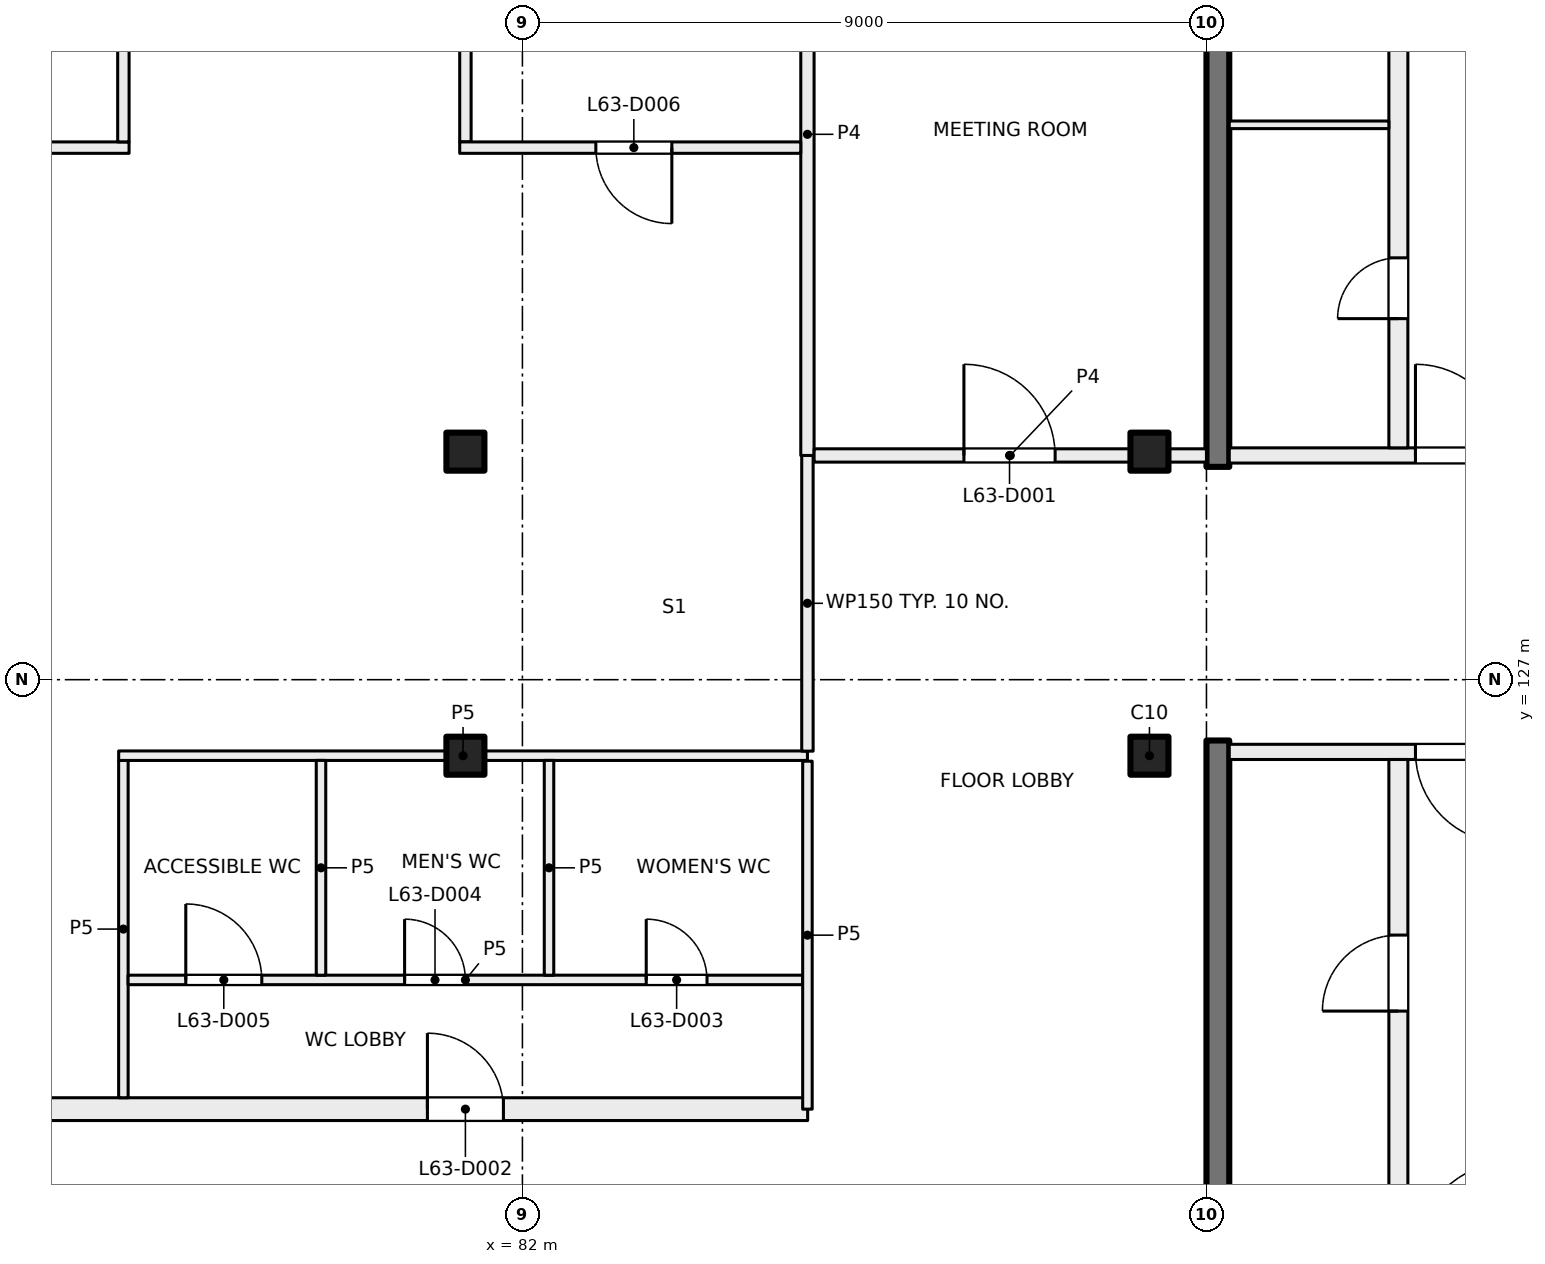
"""IFC4 building model, lengths in metres.
Left out: names, types, materials, properties, quantities, classifications, styles, units other than length and angle.
Written with IfcOpenShell. Run it as: python <this file> out.ifc"""

import sys

from ifc_helpers import new_model, si_unit, direction, frame, frame_2d, origin, origin_2d, place, context, subcontext, project, spatial, rectangle, extrude, element, fill, save


model = new_model("IFC4")
c1 = context("Model", 3, precision=1e-05, world=origin(), true_north=direction((0.0, 1.0)))
c2 = subcontext(c1, "Body", "Model", "MODEL_VIEW")
j1 = project(units=[si_unit("LENGTHUNIT", "METRE"), si_unit("PLANEANGLEUNIT", "RADIAN")], contexts=[c1])
p1 = place(None, origin())
s1 = spatial("IfcSite", under=j1, at=p1, CompositionType="ELEMENT")
p2 = place(p1, origin())
s2 = spatial("IfcBuilding", under=s1, at=p2, CompositionType="ELEMENT")
p3 = place(p2, frame((0.0, 0.0, 265.5)))
s3 = spatial("IfcBuildingStorey", under=s2, at=p3, CompositionType="ELEMENT", Elevation=265.5)
for number, where, z_axis, x_axis in (
    (1, (81.25, 130.0, 0.0), (0.0, 0.0, 1.0), (1.0, 0.0, 0.0)),
    (2, (90.25, 130.0, 0.0), (0.0, 0.0, 1.0), (1.0, 0.0, 0.0)),
    (3, (81.25, 126.0, 0.0), (0.0, 0.0, 1.0), (1.0, 0.0, 0.0)),
    (4, (90.25, 126.0, 0.0), (0.0, 0.0, 1.0), (1.0, 0.0, 0.0)),
):
    element("IfcColumn", number, at=place(p3, frame(where, z_axis=z_axis, x_axis=x_axis)), inside=s3, PredefinedType="COLUMN", context=c2, shape_type="SweptSolid", body=[
        extrude(rectangle(XDim=0.5, YDim=0.5, at=origin_2d()), origin(), (0.0, 0.0, 1.0), 4.0),
    ])
for number, where, z_axis, x_axis in (
    (5, (91.15, 138.55, 0.0), (0.0, 0.0, 1.0), (0.0, -1.0, 0.0)),
    (6, (91.15, 126.2, 0.0), (0.0, 0.0, 1.0), (0.0, -1.0, 0.0)),
):
    element("IfcWall", number, at=place(p3, frame(where, z_axis=z_axis, x_axis=x_axis)), inside=s3, PredefinedType="SHEAR", context=c2, shape_type="SweptSolid", body=[
        extrude(rectangle(XDim=8.75, YDim=0.3, at=frame_2d((4.375, 0.0))), origin(), (0.0, 0.0, 1.0), 4.0),
    ])
p4 = place(p3, frame((95.25, 126.05, 0.0), z_axis=(0.0, 0.0, 1.0), x_axis=(-1.0, 0.0, 0.0)))
e7 = element("IfcWall", 7, at=p4, inside=s3, PredefinedType="PARTITIONING", context=c2, shape_type="SweptSolid", body=[
    extrude(rectangle(XDim=3.95, YDim=0.2, at=frame_2d((1.975, 0.0))), origin(), (0.0, 0.0, 1.0), 3.625),
])
p5 = place(p4, frame((0.3, 0.0, 0.0)))
e8 = element("IfcOpeningElement", 8, at=p5, cuts=e7, PredefinedType="OPENING", context=c2, shape_type="SweptSolid", body=[
    extrude(rectangle(XDim=1.2, YDim=2.1, at=frame_2d((0.6, 1.05))), frame((0.0, 0.11, 0.0), z_axis=(0.0, -1.0, 0.0), x_axis=(1.0, 0.0, 0.0)), (0.0, 0.0, 1.0), 0.22),
])
p6 = place(p3, frame((93.525, 117.45, 0.0), z_axis=(0.0, 0.0, 1.0), x_axis=(0.0, 1.0, 0.0)))
e9 = element("IfcWall", 9, at=p6, inside=s3, PredefinedType="PARTITIONING", context=c2, shape_type="SweptSolid", body=[
    extrude(rectangle(XDim=8.5, YDim=0.25, at=frame_2d((4.25, 0.0))), origin(), (0.0, 0.0, 1.0), 3.625),
])
p7 = place(p6, frame((5.19, 0.0, 0.0)))
e10 = element("IfcOpeningElement", 10, at=p7, cuts=e9, PredefinedType="OPENING", context=c2, shape_type="SweptSolid", body=[
    extrude(rectangle(XDim=1.0, YDim=2.1, at=frame_2d((0.5, 1.05))), frame((0.0, 0.135, 0.0), z_axis=(0.0, -1.0, 0.0), x_axis=(1.0, 0.0, 0.0)), (0.0, 0.0, 1.0), 0.27),
])
p8 = place(p6, frame((0.99, 0.0, 0.0)))
e11 = element("IfcOpeningElement", 11, at=p8, cuts=e9, PredefinedType="OPENING", context=c2, shape_type="SweptSolid", body=[
    extrude(rectangle(XDim=0.8, YDim=2.1, at=frame_2d((0.4, 1.05))), frame((0.0, 0.135, 0.0), z_axis=(0.0, -1.0, 0.0), x_axis=(1.0, 0.0, 0.0)), (0.0, 0.0, 1.0), 0.27),
])
p9 = place(p3, frame((91.3, 129.95, 0.0), z_axis=(0.0, 0.0, 1.0), x_axis=(1.0, 0.0, 0.0)))
e12 = element("IfcWall", 12, at=p9, inside=s3, PredefinedType="PARTITIONING", context=c2, shape_type="SweptSolid", body=[
    extrude(rectangle(XDim=3.95, YDim=0.2, at=frame_2d((1.975, 0.0))), origin(), (0.0, 0.0, 1.0), 3.625),
])
p10 = place(p9, frame((2.45, 0.0, 0.0)))
e13 = element("IfcOpeningElement", 13, at=p10, cuts=e12, PredefinedType="OPENING", context=c2, shape_type="SweptSolid", body=[
    extrude(rectangle(XDim=1.2, YDim=2.1, at=frame_2d((0.6, 1.05))), frame((0.0, 0.11, 0.0), z_axis=(0.0, -1.0, 0.0), x_axis=(1.0, 0.0, 0.0)), (0.0, 0.0, 1.0), 0.22),
])
p11 = place(p3, frame((93.525, 130.05, 0.0), z_axis=(0.0, 0.0, 1.0), x_axis=(0.0, 1.0, 0.0)))
e14 = element("IfcWall", 14, at=p11, inside=s3, PredefinedType="PARTITIONING", context=c2, shape_type="SweptSolid", body=[
    extrude(rectangle(XDim=8.5, YDim=0.25, at=frame_2d((4.25, 0.0))), origin(), (0.0, 0.0, 1.0), 3.625),
])
p12 = place(p11, frame((1.7, 0.0, 0.0)))
e15 = element("IfcOpeningElement", 15, at=p12, cuts=e14, PredefinedType="OPENING", context=c2, shape_type="SweptSolid", body=[
    extrude(rectangle(XDim=0.8, YDim=2.1, at=frame_2d((0.4, 1.05))), frame((0.0, 0.135, 0.0), z_axis=(0.0, -1.0, 0.0), x_axis=(1.0, 0.0, 0.0)), (0.0, 0.0, 1.0), 0.27),
])
p13 = place(p11, frame((5.9, 0.0, 0.0)))
e16 = element("IfcOpeningElement", 16, at=p13, cuts=e14, PredefinedType="OPENING", context=c2, shape_type="SweptSolid", body=[
    extrude(rectangle(XDim=1.0, YDim=2.1, at=frame_2d((0.5, 1.05))), frame((0.0, 0.135, 0.0), z_axis=(0.0, -1.0, 0.0), x_axis=(1.0, 0.0, 0.0)), (0.0, 0.0, 1.0), 0.27),
])
p14 = place(p3, frame((91.3, 134.3, 0.0), z_axis=(0.0, 0.0, 1.0), x_axis=(1.0, 0.0, 0.0)))
e17 = element("IfcWall", 17, at=p14, inside=s3, PredefinedType="PARTITIONING", context=c2, shape_type="SweptSolid", body=[
    extrude(rectangle(XDim=2.1, YDim=0.1, at=frame_2d((1.05, 0.0))), origin(), (0.0, 0.0, 1.0), 3.625),
])
p15 = place(p3, frame((54.4, 121.35, 0.0), z_axis=(0.0, 0.0, 1.0), x_axis=(1.0, 0.0, 0.0)))
e18 = element("IfcWall", 18, at=p15, inside=s3, PredefinedType="PARTITIONING", context=c2, shape_type="SweptSolid", body=[
    extrude(rectangle(XDim=31.353, YDim=0.3, at=frame_2d((15.677, 0.0))), origin(), (0.0, 0.0, 1.0), 3.625),
])
p16 = place(p15, frame((26.35, 0.0, 0.0)))
e19 = element("IfcOpeningElement", 19, at=p16, cuts=e18, PredefinedType="OPENING", context=c2, shape_type="SweptSolid", body=[
    extrude(rectangle(XDim=1.0, YDim=2.1, at=frame_2d((0.5, 1.05))), frame((0.0, 0.16, 0.0), z_axis=(0.0, -1.0, 0.0), x_axis=(1.0, 0.0, 0.0)), (0.0, 0.0, 1.0), 0.32),
])
p17 = place(p15, frame((10.265, 0.0, 0.0)))
e20 = element("IfcOpeningElement", 20, at=p17, cuts=e18, PredefinedType="OPENING", context=c2, shape_type="SweptSolid", body=[
    extrude(rectangle(XDim=1.8, YDim=2.1, at=frame_2d((0.9, 1.05))), frame((0.0, 0.16, 0.0), z_axis=(0.0, -1.0, 0.0), x_axis=(1.0, 0.0, 0.0)), (0.0, 0.0, 1.0), 0.32),
])
p18 = place(p3, frame((76.825, 134.0, 0.0), z_axis=(0.0, 0.0, 1.0), x_axis=(-1.0, 0.0, 0.0)))
e21 = element("IfcWall", 21, at=p18, inside=s3, PredefinedType="PARTITIONING", context=c2, shape_type="SweptSolid", body=[
    extrude(rectangle(XDim=13.65, YDim=0.15, at=frame_2d((6.825, 0.0))), origin(), (0.0, 0.0, 1.0), 3.625),
])
p19 = place(p18, frame((1.825, 0.0, 0.0)))
e22 = element("IfcOpeningElement", 22, at=p19, cuts=e21, PredefinedType="OPENING", context=c2, shape_type="SweptSolid", body=[
    extrude(rectangle(XDim=1.0, YDim=2.1, at=frame_2d((0.5, 1.05))), frame((0.0, 0.085, 0.0), z_axis=(0.0, -1.0, 0.0), x_axis=(1.0, 0.0, 0.0)), (0.0, 0.0, 1.0), 0.17),
])
p20 = place(p3, frame((76.75, 121.5, 0.0), z_axis=(0.0, 0.0, 1.0), x_axis=(0.0, 1.0, 0.0)))
e23 = element("IfcWall", 23, at=p20, inside=s3, PredefinedType="PARTITIONING", context=c2, shape_type="SweptSolid", body=[
    extrude(rectangle(XDim=4.438, YDim=0.125, at=frame_2d((2.219, 0.0))), origin(), (0.0, 0.0, 1.0), 3.625),
])
p21 = place(p3, frame((76.812, 123.05, 0.0), z_axis=(0.0, 0.0, 1.0), x_axis=(1.0, 0.0, 0.0)))
e24 = element("IfcWall", 24, at=p21, inside=s3, PredefinedType="PARTITIONING", context=c2, shape_type="SweptSolid", body=[
    extrude(rectangle(XDim=8.876, YDim=0.125, at=frame_2d((4.438, 0.0))), origin(), (0.0, 0.0, 1.0), 3.625),
])
p22 = place(p21, frame((6.817, 0.0, 0.0)))
e25 = element("IfcOpeningElement", 25, at=p22, cuts=e24, PredefinedType="OPENING", context=c2, shape_type="SweptSolid", body=[
    extrude(rectangle(XDim=0.8, YDim=2.1, at=frame_2d((0.4, 1.05))), frame((0.0, 0.073, 0.0), z_axis=(0.0, -1.0, 0.0), x_axis=(1.0, 0.0, 0.0)), (0.0, 0.0, 1.0), 0.145),
])
p23 = place(p21, frame((3.638, 0.0, 0.0)))
e26 = element("IfcOpeningElement", 26, at=p23, cuts=e24, PredefinedType="OPENING", context=c2, shape_type="SweptSolid", body=[
    extrude(rectangle(XDim=0.8, YDim=2.1, at=frame_2d((0.4, 1.05))), frame((0.0, 0.073, 0.0), z_axis=(0.0, -1.0, 0.0), x_axis=(1.0, 0.0, 0.0)), (0.0, 0.0, 1.0), 0.145),
])
p24 = place(p21, frame((0.759, 0.0, 0.0)))
e27 = element("IfcOpeningElement", 27, at=p24, cuts=e24, PredefinedType="OPENING", context=c2, shape_type="SweptSolid", body=[
    extrude(rectangle(XDim=1.0, YDim=2.1, at=frame_2d((0.5, 1.05))), frame((0.0, 0.073, 0.0), z_axis=(0.0, -1.0, 0.0), x_axis=(1.0, 0.0, 0.0)), (0.0, 0.0, 1.0), 0.145),
])
p25 = place(p3, frame((76.688, 126.0, 0.0), z_axis=(0.0, 0.0, 1.0), x_axis=(1.0, 0.0, 0.0)))
e28 = element("IfcWall", 28, at=p25, inside=s3, PredefinedType="PARTITIONING", context=c2, shape_type="SweptSolid", body=[
    extrude(rectangle(XDim=9.062, YDim=0.125, at=frame_2d((4.531, 0.0))), origin(), (0.0, 0.0, 1.0), 3.625),
])
p26 = place(p3, frame((76.75, 138.4, 0.0), z_axis=(0.0, 0.0, 1.0), x_axis=(0.0, -1.0, 0.0)))
e29 = element("IfcWall", 29, at=p26, inside=s3, PredefinedType="PARTITIONING", context=c2, shape_type="SweptSolid", body=[
    extrude(rectangle(XDim=4.325, YDim=0.15, at=frame_2d((2.163, 0.0))), origin(), (0.0, 0.0, 1.0), 3.625),
])
p27 = place(p3, frame((79.35, 125.938, 0.0), z_axis=(0.0, 0.0, 1.0), x_axis=(0.0, -1.0, 0.0)))
e30 = element("IfcWall", 30, at=p27, inside=s3, PredefinedType="PARTITIONING", context=c2, shape_type="SweptSolid", body=[
    extrude(rectangle(XDim=2.826, YDim=0.125, at=frame_2d((1.413, 0.0))), origin(), (0.0, 0.0, 1.0), 3.625),
])
p28 = place(p3, frame((81.25, 134.075, 0.0), z_axis=(0.0, 0.0, 1.0), x_axis=(0.0, 1.0, 0.0)))
e31 = element("IfcWall", 31, at=p28, inside=s3, PredefinedType="PARTITIONING", context=c2, shape_type="SweptSolid", body=[
    extrude(rectangle(XDim=4.325, YDim=0.15, at=frame_2d((2.163, 0.0))), origin(), (0.0, 0.0, 1.0), 3.625),
])
p29 = place(p3, frame((82.35, 125.938, 0.0), z_axis=(0.0, 0.0, 1.0), x_axis=(0.0, -1.0, 0.0)))
e32 = element("IfcWall", 32, at=p29, inside=s3, PredefinedType="PARTITIONING", context=c2, shape_type="SweptSolid", body=[
    extrude(rectangle(XDim=2.826, YDim=0.125, at=frame_2d((1.413, 0.0))), origin(), (0.0, 0.0, 1.0), 3.625),
])
p30 = place(p3, frame((85.75, 121.35, 0.0), z_axis=(0.0, 0.0, 1.0), x_axis=(0.0, 1.0, 0.0)))
e33 = element("IfcWall", 33, at=p30, inside=s3, PredefinedType="PARTITIONING", context=c2, shape_type="SweptSolid", body=[
    extrude(rectangle(XDim=4.578, YDim=0.125, at=frame_2d((2.289, 0.0))), origin(), (0.0, 0.0, 1.0), 3.625),
])
p31 = place(p3, frame((85.75, 126.06, 0.0), z_axis=(0.0, 0.0, 1.0), x_axis=(0.0, 1.0, 0.0)))
e34 = element("IfcWall", 34, at=p31, inside=s3, PredefinedType="PARTITIONING", context=c2, shape_type="SweptSolid", body=[
    extrude(rectangle(XDim=3.89, YDim=0.15, at=frame_2d((1.945, 0.0))), origin(), (0.0, 0.0, 1.0), 3.625),
])
p32 = place(p3, frame((85.75, 129.95, 0.0), z_axis=(0.0, 0.0, 1.0), x_axis=(0.0, 1.0, 0.0)))
e35 = element("IfcWall", 35, at=p32, inside=s3, PredefinedType="PARTITIONING", context=c2, shape_type="SweptSolid", body=[
    extrude(rectangle(XDim=8.45, YDim=0.175, at=frame_2d((4.225, 0.0))), origin(), (0.0, 0.0, 1.0), 3.625),
])
p33 = place(p3, frame((85.662, 134.0, 0.0), z_axis=(0.0, 0.0, 1.0), x_axis=(-1.0, 0.0, 0.0)))
e36 = element("IfcWall", 36, at=p33, inside=s3, PredefinedType="PARTITIONING", context=c2, shape_type="SweptSolid", body=[
    extrude(rectangle(XDim=4.487, YDim=0.15, at=frame_2d((2.244, 0.0))), origin(), (0.0, 0.0, 1.0), 3.625),
])
p34 = place(p33, frame((1.696, 0.0, 0.0)))
e37 = element("IfcOpeningElement", 37, at=p34, cuts=e36, PredefinedType="OPENING", context=c2, shape_type="SweptSolid", body=[
    extrude(rectangle(XDim=1.0, YDim=2.1, at=frame_2d((0.5, 1.05))), frame((0.0, 0.085, 0.0), z_axis=(0.0, -1.0, 0.0), x_axis=(1.0, 0.0, 0.0)), (0.0, 0.0, 1.0), 0.17),
])
p35 = place(p3, frame((85.838, 129.95, 0.0), z_axis=(0.0, 0.0, 1.0), x_axis=(1.0, 0.0, 0.0)))
e38 = element("IfcWall", 38, at=p35, inside=s3, PredefinedType="PARTITIONING", context=c2, shape_type="SweptSolid", body=[
    extrude(rectangle(XDim=5.162, YDim=0.175, at=frame_2d((2.581, 0.0))), origin(), (0.0, 0.0, 1.0), 3.625),
])
p36 = place(p35, frame((1.971, 0.0, 0.0)))
e39 = element("IfcOpeningElement", 39, at=p36, cuts=e38, PredefinedType="OPENING", context=c2, shape_type="SweptSolid", body=[
    extrude(rectangle(XDim=1.2, YDim=2.1, at=frame_2d((0.6, 1.05))), frame((0.0, 0.097, 0.0), z_axis=(0.0, -1.0, 0.0), x_axis=(1.0, 0.0, 0.0)), (0.0, 0.0, 1.0), 0.195),
])
p37 = place(p5, origin())
e40 = element("IfcDoor", 40, at=p37, inside=s3, OperationType="DOUBLE_DOOR_SINGLE_SWING", PredefinedType="DOOR", context=c2, shape_type="SweptSolid", body=[
    extrude(rectangle(XDim=1.2, YDim=2.1, at=frame_2d((0.6, 1.05))), frame((0.0, 0.025, 0.0), z_axis=(0.0, -1.0, 0.0), x_axis=(1.0, 0.0, 0.0)), (0.0, 0.0, 1.0), 0.05),
])
fill(e8, e40)
p38 = place(p7, origin())
e41 = element("IfcDoor", 41, at=p38, inside=s3, OperationType="SINGLE_SWING_LEFT", PredefinedType="DOOR", context=c2, shape_type="SweptSolid", body=[
    extrude(rectangle(XDim=1.0, YDim=2.1, at=frame_2d((0.5, 1.05))), frame((0.0, 0.025, 0.0), z_axis=(0.0, -1.0, 0.0), x_axis=(1.0, 0.0, 0.0)), (0.0, 0.0, 1.0), 0.05),
])
fill(e10, e41)
p39 = place(p10, origin())
e42 = element("IfcDoor", 42, at=p39, inside=s3, OperationType="DOUBLE_DOOR_SINGLE_SWING", PredefinedType="DOOR", context=c2, shape_type="SweptSolid", body=[
    extrude(rectangle(XDim=1.2, YDim=2.1, at=frame_2d((0.6, 1.05))), frame((0.0, 0.025, 0.0), z_axis=(0.0, -1.0, 0.0), x_axis=(1.0, 0.0, 0.0)), (0.0, 0.0, 1.0), 0.05),
])
fill(e13, e42)
p40 = place(p12, origin())
e43 = element("IfcDoor", 43, at=p40, inside=s3, OperationType="SINGLE_SWING_RIGHT", PredefinedType="DOOR", context=c2, shape_type="SweptSolid", body=[
    extrude(rectangle(XDim=0.8, YDim=2.1, at=frame_2d((0.4, 1.05))), frame((0.0, 0.025, 0.0), z_axis=(0.0, -1.0, 0.0), x_axis=(1.0, 0.0, 0.0)), (0.0, 0.0, 1.0), 0.05),
])
fill(e15, e43)
p41 = place(p36, origin())
e44 = element("IfcDoor", 44, at=p41, inside=s3, OperationType="DOUBLE_DOOR_SINGLE_SWING", PredefinedType="DOOR", context=c2, shape_type="SweptSolid", body=[
    extrude(rectangle(XDim=1.2, YDim=2.1, at=frame_2d((0.6, 1.05))), frame((0.0, 0.025, 0.0), z_axis=(0.0, -1.0, 0.0), x_axis=(1.0, 0.0, 0.0)), (0.0, 0.0, 1.0), 0.05),
])
fill(e39, e44)
p42 = place(p16, origin())
e45 = element("IfcDoor", 45, at=p42, inside=s3, OperationType="SINGLE_SWING_LEFT", PredefinedType="DOOR", context=c2, shape_type="SweptSolid", body=[
    extrude(rectangle(XDim=1.0, YDim=2.1, at=frame_2d((0.5, 1.05))), frame((0.0, 0.025, 0.0), z_axis=(0.0, -1.0, 0.0), x_axis=(1.0, 0.0, 0.0)), (0.0, 0.0, 1.0), 0.05),
])
fill(e19, e45)
p43 = place(p22, origin())
e46 = element("IfcDoor", 46, at=p43, inside=s3, OperationType="SINGLE_SWING_RIGHT", PredefinedType="DOOR", context=c2, shape_type="SweptSolid", body=[
    extrude(rectangle(XDim=0.8, YDim=2.1, at=frame_2d((0.4, 1.05))), frame((0.0, 0.025, 0.0), z_axis=(0.0, -1.0, 0.0), x_axis=(1.0, 0.0, 0.0)), (0.0, 0.0, 1.0), 0.05),
])
fill(e25, e46)
p44 = place(p23, origin())
e47 = element("IfcDoor", 47, at=p44, inside=s3, OperationType="SINGLE_SWING_LEFT", PredefinedType="DOOR", context=c2, shape_type="SweptSolid", body=[
    extrude(rectangle(XDim=0.8, YDim=2.1, at=frame_2d((0.4, 1.05))), frame((0.0, 0.025, 0.0), z_axis=(0.0, -1.0, 0.0), x_axis=(1.0, 0.0, 0.0)), (0.0, 0.0, 1.0), 0.05),
])
fill(e26, e47)
p45 = place(p24, origin())
e48 = element("IfcDoor", 48, at=p45, inside=s3, OperationType="SINGLE_SWING_LEFT", PredefinedType="DOOR", context=c2, shape_type="SweptSolid", body=[
    extrude(rectangle(XDim=1.0, YDim=2.1, at=frame_2d((0.5, 1.05))), frame((0.0, 0.025, 0.0), z_axis=(0.0, -1.0, 0.0), x_axis=(1.0, 0.0, 0.0)), (0.0, 0.0, 1.0), 0.05),
])
fill(e27, e48)
p46 = place(p34, origin())
e49 = element("IfcDoor", 49, at=p46, inside=s3, OperationType="SINGLE_SWING_LEFT", PredefinedType="DOOR", context=c2, shape_type="SweptSolid", body=[
    extrude(rectangle(XDim=1.0, YDim=2.1, at=frame_2d((0.5, 1.05))), frame((0.0, 0.025, 0.0), z_axis=(0.0, -1.0, 0.0), x_axis=(1.0, 0.0, 0.0)), (0.0, 0.0, 1.0), 0.05),
])
fill(e37, e49)
save(model, sys.argv[1])
